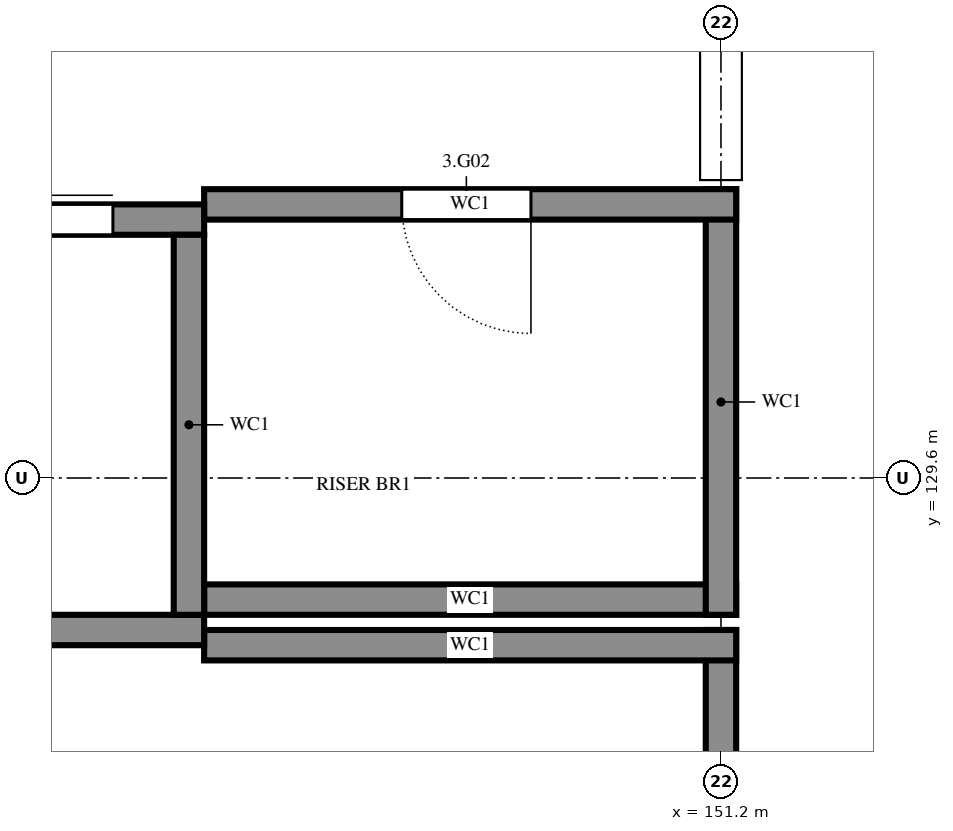
"""IFC4 building model, lengths in metres.
Left out: names, types, materials, properties, quantities, classifications, styles, units other than length and angle.
Written with IfcOpenShell. Run it as: python <this file> out.ifc"""

import sys

from ifc_helpers import new_model, si_unit, direction, frame, frame_2d, origin, place, context, subcontext, project, spatial, rectangle, extrude, element, fill, save


model = new_model("IFC4")
c1 = context("Model", 3, precision=1e-05, world=origin(), true_north=direction((0.0, 1.0)))
c2 = subcontext(c1, "Body", "Model", "MODEL_VIEW")
j1 = project(units=[si_unit("LENGTHUNIT", "METRE"), si_unit("PLANEANGLEUNIT", "RADIAN")], contexts=[c1])
p1 = place(None, origin())
s1 = spatial("IfcSite", under=j1, at=p1, CompositionType="ELEMENT")
p2 = place(p1, origin())
s2 = spatial("IfcBuilding", under=s1, at=p2, CompositionType="ELEMENT")
p3 = place(p2, frame((0.0, 0.0, 10.8)))
s3 = spatial("IfcBuildingStorey", under=s2, at=p3, CompositionType="ELEMENT", Elevation=10.8)
p4 = place(p3, frame((151.2, 125.3, 0.0), z_axis=(0.0, 0.0, 1.0), x_axis=(0.0, 1.0, 0.0)))
e1 = element("IfcWall", 1, at=p4, inside=s3, PredefinedType="SHEAR", context=c2, shape_type="SweptSolid", body=[
    extrude(rectangle(XDim=3.3, YDim=0.2, at=frame_2d((1.65, 0.0))), origin(), (0.0, 0.0, 1.0), 3.6),
])
for number, where, z_axis, x_axis in (
    (2, (147.8, 128.5, 0.0), (0.0, 0.0, 1.0), (1.0, 0.0, 0.0)),
    (3, (147.8, 128.8, 0.0), (0.0, 0.0, 1.0), (1.0, 0.0, 0.0)),
):
    element("IfcWall", number, at=place(p3, frame(where, z_axis=z_axis, x_axis=x_axis)), inside=s3, PredefinedType="SHEAR", context=c2, shape_type="SweptSolid", body=[
        extrude(rectangle(XDim=3.5, YDim=0.2, at=frame_2d((1.75, 0.0))), origin(), (0.0, 0.0, 1.0), 3.6),
    ])
p5 = place(p3, frame((151.2, 128.7, 0.0), z_axis=(0.0, 0.0, 1.0), x_axis=(0.0, 1.0, 0.0)))
e4 = element("IfcWall", 4, at=p5, inside=s3, PredefinedType="SHEAR", context=c2, shape_type="SweptSolid", body=[
    extrude(rectangle(XDim=2.8, YDim=0.2, at=frame_2d((1.4, 0.0))), origin(), (0.0, 0.0, 1.0), 3.6),
])
p6 = place(p3, frame((151.3, 131.4, 0.0), z_axis=(0.0, 0.0, 1.0), x_axis=(-1.0, 0.0, 0.0)))
e5 = element("IfcWall", 5, at=p6, inside=s3, PredefinedType="SHEAR", context=c2, shape_type="SweptSolid", body=[
    extrude(rectangle(XDim=3.5, YDim=0.2, at=frame_2d((1.75, 0.0))), origin(), (0.0, 0.0, 1.0), 3.6),
])
p7 = place(p6, frame((1.35, 0.0, 0.0)))
e6 = element("IfcOpeningElement", 6, at=p7, cuts=e5, PredefinedType="OPENING", context=c2, shape_type="SweptSolid", body=[
    extrude(rectangle(XDim=0.85, YDim=2.1, at=frame_2d((0.425, 1.05))), frame((0.0, 0.11, 0.0), z_axis=(0.0, -1.0, 0.0), x_axis=(1.0, 0.0, 0.0)), (0.0, 0.0, 1.0), 0.22),
])
p8 = place(p3, frame((145.4, 128.6, 0.0), z_axis=(0.0, 0.0, 1.0), x_axis=(1.0, 0.0, 0.0)))
e7 = element("IfcWall", 7, at=p8, inside=s3, PredefinedType="SHEAR", context=c2, shape_type="SweptSolid", body=[
    extrude(rectangle(XDim=2.4, YDim=0.2, at=frame_2d((1.2, 0.0))), origin(), (0.0, 0.0, 1.0), 3.6),
])
p9 = place(p3, frame((145.4, 131.3, 0.0), z_axis=(0.0, 0.0, 1.0), x_axis=(1.0, 0.0, 0.0)))
e8 = element("IfcWall", 8, at=p9, inside=s3, PredefinedType="SHEAR", context=c2, shape_type="SweptSolid", body=[
    extrude(rectangle(XDim=2.4, YDim=0.2, at=frame_2d((1.2, 0.0))), origin(), (0.0, 0.0, 1.0), 3.6),
])
p10 = place(p9, frame((0.6, 0.0, 0.0)))
e9 = element("IfcOpeningElement", 9, at=p10, cuts=e8, PredefinedType="OPENING", context=c2, shape_type="SweptSolid", body=[
    extrude(rectangle(XDim=1.2, YDim=2.1, at=frame_2d((0.6, 1.05))), frame((0.0, 0.11, 0.0), z_axis=(0.0, -1.0, 0.0), x_axis=(1.0, 0.0, 0.0)), (0.0, 0.0, 1.0), 0.22),
])
p11 = place(p3, frame((147.7, 128.7, 0.0), z_axis=(0.0, 0.0, 1.0), x_axis=(0.0, 1.0, 0.0)))
e10 = element("IfcWall", 10, at=p11, inside=s3, PredefinedType="SHEAR", context=c2, shape_type="SweptSolid", body=[
    extrude(rectangle(XDim=2.5, YDim=0.2, at=frame_2d((1.25, 0.0))), origin(), (0.0, 0.0, 1.0), 3.6),
])
p12 = place(p3, frame((151.2, 134.333, 0.0), z_axis=(0.0, 0.0, 1.0), x_axis=(0.0, -1.0, 0.0)))
e11 = element("IfcWall", 11, at=p12, inside=s3, PredefinedType="PARTITIONING", context=c2, shape_type="SweptSolid", body=[
    extrude(rectangle(XDim=2.772, YDim=0.275, at=frame_2d((1.386, 0.0))), origin(), (0.0, 0.0, 1.0), 3.6),
])
p13 = place(p10, origin())
e12 = element("IfcDoor", 12, at=p13, inside=s3, OperationType="SLIDING_TO_LEFT", PredefinedType="DOOR", context=c2, shape_type="SweptSolid", body=[
    extrude(rectangle(XDim=1.2, YDim=2.1, at=frame_2d((0.6, 1.05))), frame((0.0, 0.025, 0.0), z_axis=(0.0, -1.0, 0.0), x_axis=(1.0, 0.0, 0.0)), (0.0, 0.0, 1.0), 0.05),
])
fill(e9, e12)
p14 = place(p7, origin())
e13 = element("IfcDoor", 13, at=p14, inside=s3, OperationType="SINGLE_SWING_RIGHT", PredefinedType="DOOR", context=c2, shape_type="SweptSolid", body=[
    extrude(rectangle(XDim=0.85, YDim=2.1, at=frame_2d((0.425, 1.05))), frame((0.0, 0.025, 0.0), z_axis=(0.0, -1.0, 0.0), x_axis=(1.0, 0.0, 0.0)), (0.0, 0.0, 1.0), 0.05),
])
fill(e6, e13)
save(model, sys.argv[1])
